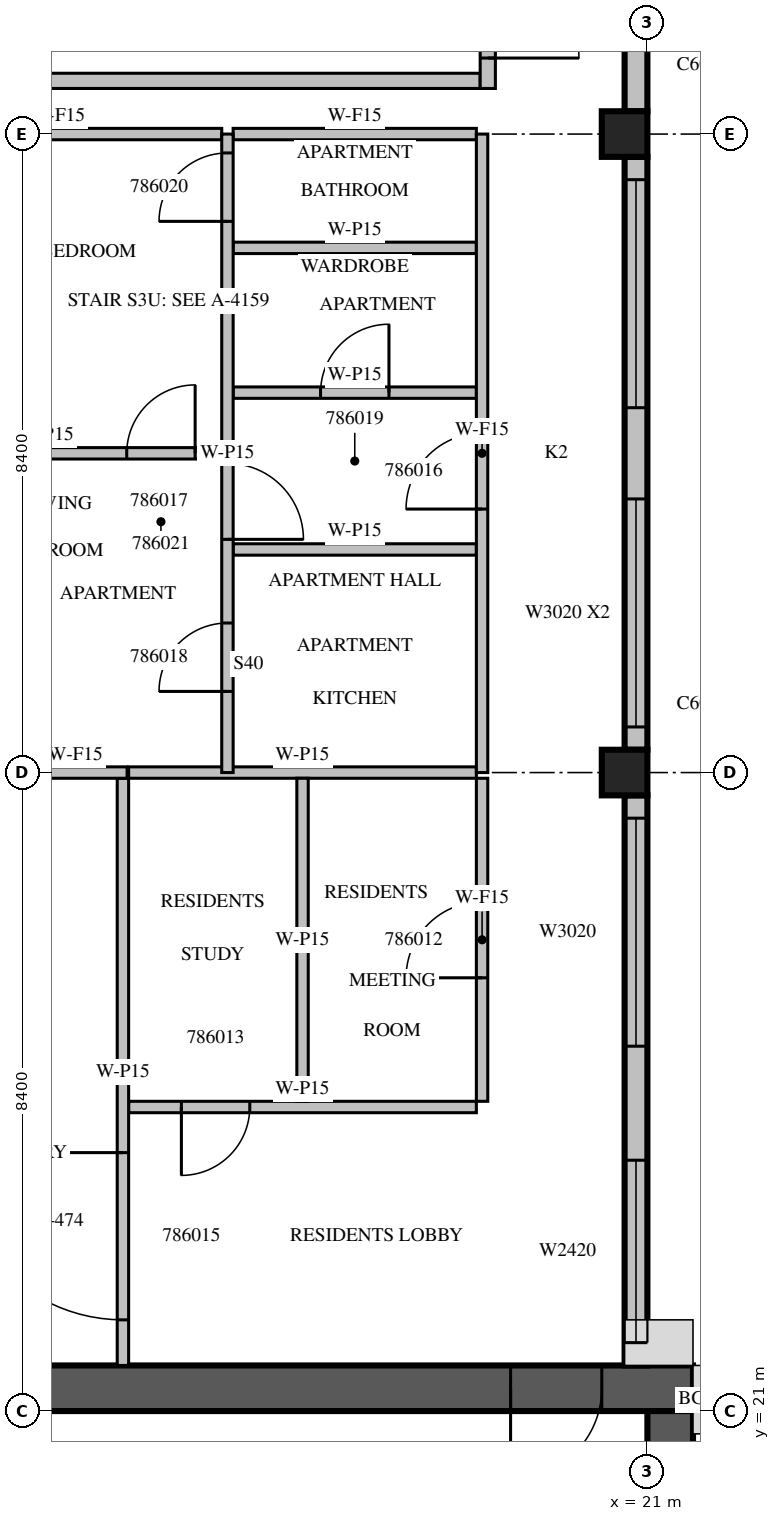
"""IFC4 building model, lengths in metres.
Left out: names, types, materials, properties, quantities, classifications, styles, units other than length and angle.
Written with IfcOpenShell. Run it as: python <this file> out.ifc"""

import sys

from ifc_helpers import new_model, si_unit, direction, frame, frame_2d, origin, origin_2d, place, context, subcontext, project, spatial, rectangle, extrude, source, transform, mapped, element, fill, save


model = new_model("IFC4")
c1 = context("Model", 3, precision=1e-05, world=origin(), true_north=direction((0.0, 1.0)))
c2 = subcontext(c1, "Body", "Model", "MODEL_VIEW")
j1 = project(units=[si_unit("LENGTHUNIT", "METRE"), si_unit("PLANEANGLEUNIT", "RADIAN")], contexts=[c1])
p1 = place(None, origin())
s1 = spatial("IfcSite", under=j1, at=p1, CompositionType="ELEMENT")
p2 = place(p1, origin())
s2 = spatial("IfcBuilding", under=s1, at=p2, CompositionType="ELEMENT")
p3 = place(p2, frame((0.0, 0.0, 361.5)))
s3 = spatial("IfcBuildingStorey", under=s2, at=p3, CompositionType="ELEMENT", Elevation=361.5)
m1 = source(origin(), c2, "Body", "SweptSolid", [
    extrude(rectangle(XDim=0.6, YDim=0.6, at=origin_2d()), origin(), (0.0, 0.0, 1.0), 3.5),
])
for number, where, z_axis, x_axis in (
    (1, (20.7, 29.4, 0.0), (0.0, 0.0, 1.0), (1.0, 0.0, 0.0)),
    (2, (20.7, 37.8, 0.0), (0.0, 0.0, 1.0), (1.0, 0.0, 0.0)),
):
    element("IfcColumn", number, at=place(p3, frame(where, z_axis=z_axis, x_axis=x_axis)), inside=s3, PredefinedType="COLUMN", context=c2, shape_type="MappedRepresentation", body=[
        mapped(m1, transform((0.0, 0.0, 0.0), scale=1.0)),
    ])
m2 = source(origin(), c2, "Body", "SweptSolid", [
    extrude(rectangle(XDim=11.1, YDim=0.6, at=frame_2d((5.55, 0.0))), origin(), (0.0, 0.0, 1.0), 3.5),
])
p4 = place(p3, frame((10.5, 21.3, 0.0), z_axis=(0.0, 0.0, 1.0), x_axis=(1.0, 0.0, 0.0)))
e3 = element("IfcWall", 3, at=p4, inside=s3, PredefinedType="SHEAR", context=c2, shape_type="MappedRepresentation", body=[
    mapped(m2, transform((0.0, 0.0, 0.0), scale=1.0)),
])
m3 = source(origin(), c2, "Body", "SweptSolid", [
    extrude(rectangle(XDim=1.2, YDim=2.1, at=frame_2d((0.6, 1.05))), frame((0.0, 0.31, 0.0), z_axis=(0.0, -1.0, 0.0), x_axis=(1.0, 0.0, 0.0)), (0.0, 0.0, 1.0), 0.62),
])
p5 = place(p4, frame((8.7, 0.0, 0.0)))
e4 = element("IfcOpeningElement", 4, at=p5, cuts=e3, PredefinedType="OPENING", context=c2, shape_type="MappedRepresentation", body=[
    mapped(m3, transform((0.0, 0.0, 0.0), scale=1.0)),
])
m4 = source(origin(), c2, "Body", "SweptSolid", [
    extrude(rectangle(XDim=10.5, YDim=0.6, at=frame_2d((5.25, 0.0))), origin(), (0.0, 0.0, 1.0), 3.5),
])
p6 = place(p3, frame((21.3, 10.5, 0.0), z_axis=(0.0, 0.0, 1.0), x_axis=(0.0, 1.0, 0.0)))
e5 = element("IfcWall", 5, at=p6, inside=s3, PredefinedType="SHEAR", context=c2, shape_type="MappedRepresentation", body=[
    mapped(m4, transform((0.0, 0.0, 0.0), scale=1.0)),
])
m5 = source(origin(), c2, "Body", "SweptSolid", [
    extrude(rectangle(XDim=1.2, YDim=2.4, at=frame_2d((0.6, 1.2))), frame((0.0, 0.31, 0.0), z_axis=(0.0, -1.0, 0.0), x_axis=(1.0, 0.0, 0.0)), (0.0, 0.0, 1.0), 0.62),
])
p7 = place(p6, frame((5.7, 0.0, 0.6)))
e6 = element("IfcOpeningElement", 6, at=p7, cuts=e5, PredefinedType="OPENING", context=c2, shape_type="MappedRepresentation", body=[
    mapped(m5, transform((0.0, 0.0, 0.0), scale=1.0)),
])
m6 = source(origin(), c2, "Body", "SweptSolid", [
    extrude(rectangle(XDim=7.5, YDim=0.3, at=frame_2d((3.75, 0.0))), origin(), (0.0, 0.0, 1.0), 3.1),
])
p8 = place(p3, frame((20.85, 21.6, 0.0), z_axis=(0.0, 0.0, 1.0), x_axis=(0.0, 1.0, 0.0)))
e7 = element("IfcWall", 7, at=p8, inside=s3, PredefinedType="STANDARD", context=c2, shape_type="MappedRepresentation", body=[
    mapped(m6, transform((0.0, 0.0, 0.0), scale=1.0)),
])
m7 = source(origin(), c2, "Body", "SweptSolid", [
    extrude(rectangle(XDim=2.4, YDim=2.0, at=frame_2d((1.2, 1.0))), frame((0.0, 0.16, 0.0), z_axis=(0.0, -1.0, 0.0), x_axis=(1.0, 0.0, 0.0)), (0.0, 0.0, 1.0), 0.32),
])
p9 = place(p8, frame((0.3, 0.0, 0.6)))
e8 = element("IfcOpeningElement", 8, at=p9, cuts=e7, PredefinedType="OPENING", context=c2, shape_type="MappedRepresentation", body=[
    mapped(m7, transform((0.0, 0.0, 0.0), scale=1.0)),
])
m8 = source(origin(), c2, "Body", "SweptSolid", [
    extrude(rectangle(XDim=3.0, YDim=2.0, at=frame_2d((1.5, 1.0))), frame((0.0, 0.16, 0.0), z_axis=(0.0, -1.0, 0.0), x_axis=(1.0, 0.0, 0.0)), (0.0, 0.0, 1.0), 0.32),
])
p10 = place(p8, frame((4.2, 0.0, 0.6)))
e9 = element("IfcOpeningElement", 9, at=p10, cuts=e7, PredefinedType="OPENING", context=c2, shape_type="MappedRepresentation", body=[
    mapped(m8, transform((0.0, 0.0, 0.0), scale=1.0)),
])
m9 = source(origin(), c2, "Body", "SweptSolid", [
    extrude(rectangle(XDim=7.8, YDim=0.3, at=frame_2d((3.9, 0.0))), origin(), (0.0, 0.0, 1.0), 3.1),
])
p11 = place(p3, frame((20.85, 29.7, 0.0), z_axis=(0.0, 0.0, 1.0), x_axis=(0.0, 1.0, 0.0)))
e10 = element("IfcWall", 10, at=p11, inside=s3, PredefinedType="STANDARD", context=c2, shape_type="MappedRepresentation", body=[
    mapped(m9, transform((0.0, 0.0, 0.0), scale=1.0)),
])
p12 = place(p11, frame((0.3, 0.0, 0.6)))
e11 = element("IfcOpeningElement", 11, at=p12, cuts=e10, PredefinedType="OPENING", context=c2, shape_type="MappedRepresentation", body=[
    mapped(m8, transform((0.0, 0.0, 0.0), scale=1.0)),
])
p13 = place(p11, frame((4.5, 0.0, 0.6)))
e12 = element("IfcOpeningElement", 12, at=p13, cuts=e10, PredefinedType="OPENING", context=c2, shape_type="MappedRepresentation", body=[
    mapped(m8, transform((0.0, 0.0, 0.0), scale=1.0)),
])
m10 = source(origin(), c2, "Body", "SweptSolid", [
    extrude(rectangle(XDim=5.58, YDim=0.3, at=frame_2d((2.79, 0.0))), origin(), (0.0, 0.0, 1.0), 3.1),
])
p14 = place(p3, frame((20.85, 38.1, 0.0), z_axis=(0.0, 0.0, 1.0), x_axis=(0.0, 1.0, 0.0)))
e13 = element("IfcWall", 13, at=p14, inside=s3, PredefinedType="STANDARD", context=c2, shape_type="MappedRepresentation", body=[
    mapped(m10, transform((0.0, 0.0, 0.0), scale=1.0)),
])
m11 = source(origin(), c2, "Body", "SweptSolid", [
    extrude(rectangle(XDim=3.6, YDim=2.0, at=frame_2d((1.8, 1.0))), frame((0.0, 0.16, 0.0), z_axis=(0.0, -1.0, 0.0), x_axis=(1.0, 0.0, 0.0)), (0.0, 0.0, 1.0), 0.32),
])
p15 = place(p14, frame((0.84, 0.0, 0.6)))
e14 = element("IfcOpeningElement", 14, at=p15, cuts=e13, PredefinedType="OPENING", context=c2, shape_type="MappedRepresentation", body=[
    mapped(m11, transform((0.0, 0.0, 0.0), scale=1.0)),
])
m12 = source(origin(), c2, "Body", "SweptSolid", [
    extrude(rectangle(XDim=8.0, YDim=0.2, at=frame_2d((4.0, 0.0))), origin(), (0.0, 0.0, 1.0), 3.1),
])
p16 = place(p3, frame((10.8, 38.5, 0.0), z_axis=(0.0, 0.0, 1.0), x_axis=(1.0, 0.0, 0.0)))
e15 = element("IfcWall", 15, at=p16, inside=s3, PredefinedType="PARTITIONING", context=c2, shape_type="MappedRepresentation", body=[
    mapped(m12, transform((0.0, 0.0, 0.0), scale=1.0)),
])
m13 = source(origin(), c2, "Body", "SweptSolid", [
    extrude(rectangle(XDim=5.45, YDim=0.2, at=frame_2d((2.725, 0.0))), origin(), (0.0, 0.0, 1.0), 3.1),
])
p17 = place(p3, frame((18.9, 38.4, 0.0), z_axis=(0.0, 0.0, 1.0), x_axis=(0.0, 1.0, 0.0)))
e16 = element("IfcWall", 16, at=p17, inside=s3, PredefinedType="PARTITIONING", context=c2, shape_type="MappedRepresentation", body=[
    mapped(m13, transform((0.0, 0.0, 0.0), scale=1.0)),
])
m14 = source(origin(), c2, "Body", "SweptSolid", [
    extrude(rectangle(XDim=1.2, YDim=2.1, at=frame_2d((0.6, 1.05))), frame((0.0, 0.11, 0.0), z_axis=(0.0, -1.0, 0.0), x_axis=(1.0, 0.0, 0.0)), (0.0, 0.0, 1.0), 0.22),
])
p18 = place(p17, frame((0.4, 0.0, 0.0)))
e17 = element("IfcOpeningElement", 17, at=p18, cuts=e16, PredefinedType="OPENING", context=c2, shape_type="MappedRepresentation", body=[
    mapped(m14, transform((0.0, 0.0, 0.0), scale=1.0)),
])
m15 = source(origin(), c2, "Body", "SweptSolid", [
    extrude(rectangle(XDim=0.9, YDim=2.1, at=frame_2d((0.45, 1.05))), frame((0.0, 0.11, 0.0), z_axis=(0.0, -1.0, 0.0), x_axis=(1.0, 0.0, 0.0)), (0.0, 0.0, 1.0), 0.22),
])
p19 = place(p17, frame((3.25, 0.0, 0.0)))
e18 = element("IfcOpeningElement", 18, at=p19, cuts=e16, PredefinedType="OPENING", context=c2, shape_type="MappedRepresentation", body=[
    mapped(m15, transform((0.0, 0.0, 0.0), scale=1.0)),
])
m16 = source(origin(), c2, "Body", "SweptSolid", [
    extrude(rectangle(XDim=4.575, YDim=0.15, at=frame_2d((2.288, 0.0))), origin(), (0.0, 0.0, 1.0), 3.1),
])
p20 = place(p3, frame((14.175, 25.0, 0.0), z_axis=(0.0, 0.0, 1.0), x_axis=(1.0, 0.0, 0.0)))
e19 = element("IfcWall", 19, at=p20, inside=s3, PredefinedType="PARTITIONING", context=c2, shape_type="MappedRepresentation", body=[
    mapped(m16, transform((0.0, 0.0, 0.0), scale=1.0)),
])
m17 = source(origin(), c2, "Body", "SweptSolid", [
    extrude(rectangle(XDim=0.9, YDim=2.1, at=frame_2d((0.45, 1.05))), frame((0.0, 0.085, 0.0), z_axis=(0.0, -1.0, 0.0), x_axis=(1.0, 0.0, 0.0)), (0.0, 0.0, 1.0), 0.17),
])
p21 = place(p20, frame((0.694, 0.0, 0.0)))
e20 = element("IfcOpeningElement", 20, at=p21, cuts=e19, PredefinedType="OPENING", context=c2, shape_type="MappedRepresentation", body=[
    mapped(m17, transform((0.0, 0.0, 0.0), scale=1.0)),
])
p22 = place(p3, frame((18.75, 29.4, 0.0), z_axis=(0.0, 0.0, 1.0), x_axis=(-1.0, 0.0, 0.0)))
e21 = element("IfcWall", 21, at=p22, inside=s3, PredefinedType="PARTITIONING", context=c2, shape_type="MappedRepresentation", body=[
    mapped(m16, transform((0.0, 0.0, 0.0), scale=1.0)),
])
m18 = source(origin(), c2, "Body", "SweptSolid", [
    extrude(rectangle(XDim=4.25, YDim=0.15, at=frame_2d((2.125, 0.0))), origin(), (0.0, 0.0, 1.0), 3.1),
])
p23 = place(p3, frame((18.825, 25.075, 0.0), z_axis=(0.0, 0.0, 1.0), x_axis=(0.0, 1.0, 0.0)))
e22 = element("IfcWall", 22, at=p23, inside=s3, PredefinedType="PARTITIONING", context=c2, shape_type="MappedRepresentation", body=[
    mapped(m18, transform((0.0, 0.0, 0.0), scale=1.0)),
])
m19 = source(origin(), c2, "Body", "SweptSolid", [
    extrude(rectangle(XDim=1.0, YDim=2.1, at=frame_2d((0.5, 1.05))), frame((0.0, 0.085, 0.0), z_axis=(0.0, -1.0, 0.0), x_axis=(1.0, 0.0, 0.0)), (0.0, 0.0, 1.0), 0.17),
])
p24 = place(p23, frame((1.625, 0.0, 0.0)))
e23 = element("IfcOpeningElement", 23, at=p24, cuts=e22, PredefinedType="OPENING", context=c2, shape_type="MappedRepresentation", body=[
    mapped(m19, transform((0.0, 0.0, 0.0), scale=1.0)),
])
p25 = place(p3, frame((16.463, 25.075, 0.0), z_axis=(0.0, 0.0, 1.0), x_axis=(0.0, 1.0, 0.0)))
e24 = element("IfcWall", 24, at=p25, inside=s3, PredefinedType="PARTITIONING", context=c2, shape_type="MappedRepresentation", body=[
    mapped(m18, transform((0.0, 0.0, 0.0), scale=1.0)),
])
m20 = source(origin(), c2, "Body", "SweptSolid", [
    extrude(rectangle(XDim=7.725, YDim=0.15, at=frame_2d((3.862, 0.0))), origin(), (0.0, 0.0, 1.0), 3.1),
])
p26 = place(p3, frame((14.1, 29.325, 0.0), z_axis=(0.0, 0.0, 1.0), x_axis=(0.0, -1.0, 0.0)))
e25 = element("IfcWall", 25, at=p26, inside=s3, PredefinedType="PARTITIONING", context=c2, shape_type="MappedRepresentation", body=[
    mapped(m20, transform((0.0, 0.0, 0.0), scale=1.0)),
])
m21 = source(origin(), c2, "Body", "SweptSolid", [
    extrude(rectangle(XDim=2.2, YDim=2.1, at=frame_2d((1.1, 1.05))), frame((0.0, 0.085, 0.0), z_axis=(0.0, -1.0, 0.0), x_axis=(1.0, 0.0, 0.0)), (0.0, 0.0, 1.0), 0.17),
])
p27 = place(p26, frame((4.925, 0.0, 0.0)))
e26 = element("IfcOpeningElement", 26, at=p27, cuts=e25, PredefinedType="OPENING", context=c2, shape_type="MappedRepresentation", body=[
    mapped(m21, transform((0.0, 0.0, 0.0), scale=1.0)),
])
m22 = source(origin(), c2, "Body", "SweptSolid", [
    extrude(rectangle(XDim=4.6, YDim=0.15, at=frame_2d((2.3, 0.0))), origin(), (0.0, 0.0, 1.0), 3.1),
])
p28 = place(p3, frame((15.4, 33.6, 0.0), z_axis=(0.0, 0.0, 1.0), x_axis=(-1.0, 0.0, 0.0)))
e27 = element("IfcWall", 27, at=p28, inside=s3, PredefinedType="PARTITIONING", context=c2, shape_type="MappedRepresentation", body=[
    mapped(m22, transform((0.0, 0.0, 0.0), scale=1.0)),
])
p29 = place(p28, frame((0.35, 0.0, 0.0)))
e28 = element("IfcOpeningElement", 28, at=p29, cuts=e27, PredefinedType="OPENING", context=c2, shape_type="MappedRepresentation", body=[
    mapped(m17, transform((0.0, 0.0, 0.0), scale=1.0)),
])
m23 = source(origin(), c2, "Body", "SweptSolid", [
    extrude(rectangle(XDim=3.2, YDim=0.15, at=frame_2d((1.6, 0.0))), origin(), (0.0, 0.0, 1.0), 3.1),
])
p30 = place(p3, frame((18.75, 32.335, 0.0), z_axis=(0.0, 0.0, 1.0), x_axis=(-1.0, 0.0, 0.0)))
e29 = element("IfcWall", 29, at=p30, inside=s3, PredefinedType="PARTITIONING", context=c2, shape_type="MappedRepresentation", body=[
    mapped(m23, transform((0.0, 0.0, 0.0), scale=1.0)),
])
p31 = place(p3, frame((18.75, 34.398, 0.0), z_axis=(0.0, 0.0, 1.0), x_axis=(-1.0, 0.0, 0.0)))
e30 = element("IfcWall", 30, at=p31, inside=s3, PredefinedType="PARTITIONING", context=c2, shape_type="MappedRepresentation", body=[
    mapped(m23, transform((0.0, 0.0, 0.0), scale=1.0)),
])
p32 = place(p31, frame((1.15, 0.0, 0.0)))
e31 = element("IfcOpeningElement", 31, at=p32, cuts=e30, PredefinedType="OPENING", context=c2, shape_type="MappedRepresentation", body=[
    mapped(m17, transform((0.0, 0.0, 0.0), scale=1.0)),
])
p33 = place(p3, frame((18.75, 36.303, 0.0), z_axis=(0.0, 0.0, 1.0), x_axis=(-1.0, 0.0, 0.0)))
e32 = element("IfcWall", 32, at=p33, inside=s3, PredefinedType="PARTITIONING", context=c2, shape_type="MappedRepresentation", body=[
    mapped(m23, transform((0.0, 0.0, 0.0), scale=1.0)),
])
m24 = source(origin(), c2, "Body", "SweptSolid", [
    extrude(rectangle(XDim=1.35, YDim=0.15, at=frame_2d((0.675, 0.0))), origin(), (0.0, 0.0, 1.0), 3.1),
])
p34 = place(p3, frame((14.155, 29.4, 0.0), z_axis=(0.0, 0.0, 1.0), x_axis=(-1.0, 0.0, 0.0)))
e33 = element("IfcWall", 33, at=p34, inside=s3, PredefinedType="PARTITIONING", context=c2, shape_type="MappedRepresentation", body=[
    mapped(m24, transform((0.0, 0.0, 0.0), scale=1.0)),
])
m25 = source(origin(), c2, "Body", "SweptSolid", [
    extrude(rectangle(XDim=4.301, YDim=0.15, at=frame_2d((2.151, 0.0))), origin(), (0.0, 0.0, 1.0), 3.1),
])
p35 = place(p3, frame((15.4, 37.8, 0.0), z_axis=(0.0, 0.0, 1.0), x_axis=(-1.0, 0.0, 0.0)))
e34 = element("IfcWall", 34, at=p35, inside=s3, PredefinedType="PARTITIONING", context=c2, shape_type="MappedRepresentation", body=[
    mapped(m25, transform((0.0, 0.0, 0.0), scale=1.0)),
])
p36 = place(p3, frame((18.75, 37.8, 0.0), z_axis=(0.0, 0.0, 1.0), x_axis=(-1.0, 0.0, 0.0)))
e35 = element("IfcWall", 35, at=p36, inside=s3, PredefinedType="PARTITIONING", context=c2, shape_type="MappedRepresentation", body=[
    mapped(m23, transform((0.0, 0.0, 0.0), scale=1.0)),
])
m26 = source(origin(), c2, "Body", "SweptSolid", [
    extrude(rectangle(XDim=8.4, YDim=0.15, at=frame_2d((4.2, 0.0))), origin(), (0.0, 0.0, 1.0), 3.1),
])
p37 = place(p3, frame((15.475, 29.4, 0.0), z_axis=(0.0, 0.0, 1.0), x_axis=(0.0, 1.0, 0.0)))
e36 = element("IfcWall", 36, at=p37, inside=s3, PredefinedType="PARTITIONING", context=c2, shape_type="MappedRepresentation", body=[
    mapped(m26, transform((0.0, 0.0, 0.0), scale=1.0)),
])
p38 = place(p37, frame((3.068, 0.0, 0.0)))
e37 = element("IfcOpeningElement", 37, at=p38, cuts=e36, PredefinedType="OPENING", context=c2, shape_type="MappedRepresentation", body=[
    mapped(m19, transform((0.0, 0.0, 0.0), scale=1.0)),
])
p39 = place(p37, frame((1.067, 0.0, 0.0)))
e38 = element("IfcOpeningElement", 38, at=p39, cuts=e36, PredefinedType="OPENING", context=c2, shape_type="MappedRepresentation", body=[
    mapped(m17, transform((0.0, 0.0, 0.0), scale=1.0)),
])
p40 = place(p37, frame((7.252, 0.0, 0.0)))
e39 = element("IfcOpeningElement", 39, at=p40, cuts=e36, PredefinedType="OPENING", context=c2, shape_type="MappedRepresentation", body=[
    mapped(m17, transform((0.0, 0.0, 0.0), scale=1.0)),
])
p41 = place(p3, frame((18.825, 29.4, 0.0), z_axis=(0.0, 0.0, 1.0), x_axis=(0.0, 1.0, 0.0)))
e40 = element("IfcWall", 40, at=p41, inside=s3, PredefinedType="PARTITIONING", context=c2, shape_type="MappedRepresentation", body=[
    mapped(m26, transform((0.0, 0.0, 0.0), scale=1.0)),
])
p42 = place(p41, frame((3.467, 0.0, 0.0)))
e41 = element("IfcOpeningElement", 41, at=p42, cuts=e40, PredefinedType="OPENING", context=c2, shape_type="MappedRepresentation", body=[
    mapped(m19, transform((0.0, 0.0, 0.0), scale=1.0)),
])
m27 = source(origin(), c2, "Body", "SweptSolid", [
    extrude(rectangle(XDim=2.4, YDim=2.0, at=frame_2d((1.2, 1.0))), frame((0.0, 0.03, 0.0), z_axis=(0.0, -1.0, 0.0), x_axis=(1.0, 0.0, 0.0)), (0.0, 0.0, 1.0), 0.06),
])
p43 = place(p9, origin())
e42 = element("IfcWindow", 42, at=p43, inside=s3, PartitioningType="SINGLE_PANEL", PredefinedType="WINDOW", context=c2, shape_type="MappedRepresentation", body=[
    mapped(m27, transform((0.0, 0.0, 0.0), scale=1.0)),
])
fill(e8, e42)
m28 = source(origin(), c2, "Body", "SweptSolid", [
    extrude(rectangle(XDim=3.0, YDim=2.0, at=frame_2d((1.5, 1.0))), frame((0.0, 0.03, 0.0), z_axis=(0.0, -1.0, 0.0), x_axis=(1.0, 0.0, 0.0)), (0.0, 0.0, 1.0), 0.06),
])
p44 = place(p10, origin())
e43 = element("IfcWindow", 43, at=p44, inside=s3, PartitioningType="SINGLE_PANEL", PredefinedType="WINDOW", context=c2, shape_type="MappedRepresentation", body=[
    mapped(m28, transform((0.0, 0.0, 0.0), scale=1.0)),
])
fill(e9, e43)
p45 = place(p12, origin())
e44 = element("IfcWindow", 44, at=p45, inside=s3, PartitioningType="SINGLE_PANEL", PredefinedType="WINDOW", context=c2, shape_type="MappedRepresentation", body=[
    mapped(m28, transform((0.0, 0.0, 0.0), scale=1.0)),
])
fill(e11, e44)
p46 = place(p13, origin())
e45 = element("IfcWindow", 45, at=p46, inside=s3, PartitioningType="SINGLE_PANEL", PredefinedType="WINDOW", context=c2, shape_type="MappedRepresentation", body=[
    mapped(m28, transform((0.0, 0.0, 0.0), scale=1.0)),
])
fill(e12, e45)
m29 = source(origin(), c2, "Body", "SweptSolid", [
    extrude(rectangle(XDim=1.2, YDim=2.1, at=frame_2d((0.6, 1.05))), frame((0.0, 0.025, 0.0), z_axis=(0.0, -1.0, 0.0), x_axis=(1.0, 0.0, 0.0)), (0.0, 0.0, 1.0), 0.05),
])
p47 = place(p18, origin())
e46 = element("IfcDoor", 46, at=p47, inside=s3, OperationType="SINGLE_SWING_RIGHT", PredefinedType="DOOR", context=c2, shape_type="MappedRepresentation", body=[
    mapped(m29, transform((0.0, 0.0, 0.0), scale=1.0)),
])
fill(e17, e46)
p48 = place(p5, origin())
e47 = element("IfcDoor", 47, at=p48, inside=s3, OperationType="SINGLE_SWING_RIGHT", PredefinedType="DOOR", context=c2, shape_type="MappedRepresentation", body=[
    mapped(m29, transform((0.0, 0.0, 0.0), scale=1.0)),
])
fill(e4, e47)
m30 = source(origin(), c2, "Body", "SweptSolid", [
    extrude(rectangle(XDim=1.0, YDim=2.1, at=frame_2d((0.5, 1.05))), frame((0.0, 0.025, 0.0), z_axis=(0.0, -1.0, 0.0), x_axis=(1.0, 0.0, 0.0)), (0.0, 0.0, 1.0), 0.05),
])
p49 = place(p24, origin())
e48 = element("IfcDoor", 48, at=p49, inside=s3, OperationType="SINGLE_SWING_LEFT", PredefinedType="DOOR", context=c2, shape_type="MappedRepresentation", body=[
    mapped(m30, transform((0.0, 0.0, 0.0), scale=1.0)),
])
fill(e23, e48)
m31 = source(origin(), c2, "Body", "SweptSolid", [
    extrude(rectangle(XDim=0.9, YDim=2.1, at=frame_2d((0.45, 1.05))), frame((0.0, 0.025, 0.0), z_axis=(0.0, -1.0, 0.0), x_axis=(1.0, 0.0, 0.0)), (0.0, 0.0, 1.0), 0.05),
])
p50 = place(p21, origin())
e49 = element("IfcDoor", 49, at=p50, inside=s3, OperationType="SINGLE_SWING_RIGHT", PredefinedType="DOOR", context=c2, shape_type="MappedRepresentation", body=[
    mapped(m31, transform((0.0, 0.0, 0.0), scale=1.0)),
])
fill(e20, e49)
m32 = source(origin(), c2, "Body", "SweptSolid", [
    extrude(rectangle(XDim=2.2, YDim=2.1, at=frame_2d((1.1, 1.05))), frame((0.0, 0.025, 0.0), z_axis=(0.0, -1.0, 0.0), x_axis=(1.0, 0.0, 0.0)), (0.0, 0.0, 1.0), 0.05),
])
p51 = place(p27, origin())
e50 = element("IfcDoor", 50, at=p51, inside=s3, OperationType="DOUBLE_DOOR_SINGLE_SWING", PredefinedType="DOOR", context=c2, shape_type="MappedRepresentation", body=[
    mapped(m32, transform((0.0, 0.0, 0.0), scale=1.0)),
])
fill(e26, e50)
p52 = place(p42, origin())
e51 = element("IfcDoor", 51, at=p52, inside=s3, OperationType="SINGLE_SWING_LEFT", PredefinedType="DOOR", context=c2, shape_type="MappedRepresentation", body=[
    mapped(m30, transform((0.0, 0.0, 0.0), scale=1.0)),
])
fill(e41, e51)
p53 = place(p38, origin())
e52 = element("IfcDoor", 52, at=p53, inside=s3, OperationType="SINGLE_SWING_RIGHT", PredefinedType="DOOR", context=c2, shape_type="MappedRepresentation", body=[
    mapped(m30, transform((0.0, 0.0, 0.0), scale=1.0)),
])
fill(e37, e52)
p54 = place(p39, origin())
e53 = element("IfcDoor", 53, at=p54, inside=s3, OperationType="SINGLE_SWING_LEFT", PredefinedType="DOOR", context=c2, shape_type="MappedRepresentation", body=[
    mapped(m31, transform((0.0, 0.0, 0.0), scale=1.0)),
])
fill(e38, e53)
p55 = place(p32, origin())
e54 = element("IfcDoor", 54, at=p55, inside=s3, OperationType="SINGLE_SWING_RIGHT", PredefinedType="DOOR", context=c2, shape_type="MappedRepresentation", body=[
    mapped(m31, transform((0.0, 0.0, 0.0), scale=1.0)),
])
fill(e31, e54)
p56 = place(p40, origin())
e55 = element("IfcDoor", 55, at=p56, inside=s3, OperationType="SINGLE_SWING_LEFT", PredefinedType="DOOR", context=c2, shape_type="MappedRepresentation", body=[
    mapped(m31, transform((0.0, 0.0, 0.0), scale=1.0)),
])
fill(e39, e55)
p57 = place(p29, origin())
e56 = element("IfcDoor", 56, at=p57, inside=s3, OperationType="SINGLE_SWING_RIGHT", PredefinedType="DOOR", context=c2, shape_type="MappedRepresentation", body=[
    mapped(m31, transform((0.0, 0.0, 0.0), scale=1.0)),
])
fill(e28, e56)
save(model, sys.argv[1])
